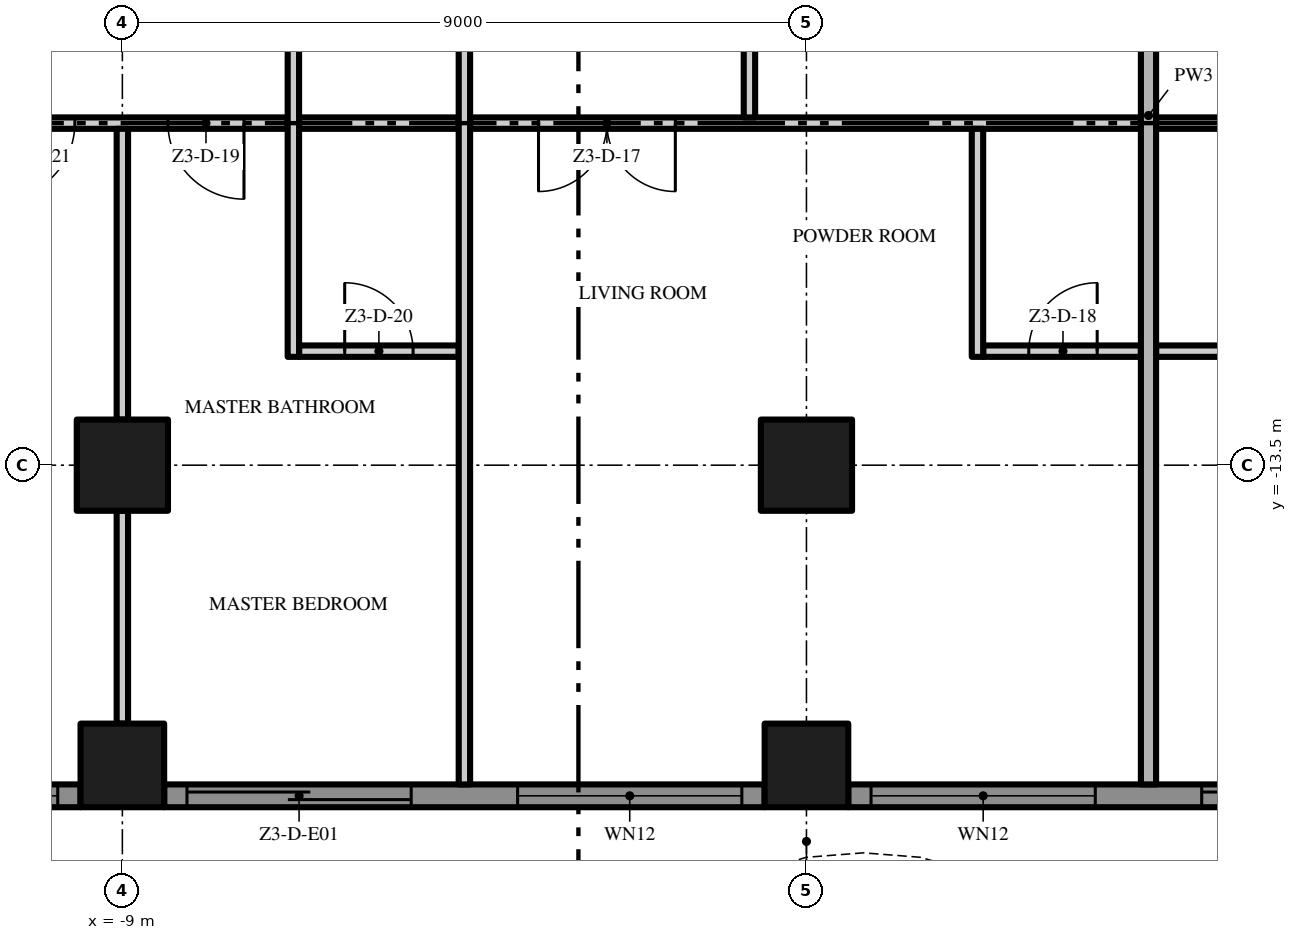
"""IFC4 building model, lengths in metres.
Left out: names, types, materials, properties, quantities, classifications, styles, units other than length and angle.
Written with IfcOpenShell. Run it as: python <this file> out.ifc"""

import sys

from ifc_helpers import new_model, si_unit, direction, frame, frame_2d, origin, origin_2d, place, context, subcontext, project, spatial, polyline, rectangle, outline, extrude, element, fill, save


model = new_model("IFC4")
c1 = context("Model", 3, precision=1e-05, world=origin(), true_north=direction((0.0, 1.0)))
c2 = subcontext(c1, "Body", "Model", "MODEL_VIEW")
j1 = project(units=[si_unit("LENGTHUNIT", "METRE"), si_unit("PLANEANGLEUNIT", "RADIAN")], contexts=[c1])
p1 = place(None, origin())
s1 = spatial("IfcSite", under=j1, at=p1, CompositionType="ELEMENT")
p2 = place(p1, origin())
s2 = spatial("IfcBuilding", under=s1, at=p2, CompositionType="ELEMENT")
p3 = place(p2, frame((0.0, 0.0, 159.2)))
s3 = spatial("IfcBuildingStorey", under=s2, at=p3, CompositionType="ELEMENT", Elevation=159.2)
p4 = place(p3, frame((-9.0, -13.5, 0.0), z_axis=(0.0, 0.0, 1.0), x_axis=(1.0, 0.0, 0.0)))
e1 = element("IfcColumn", 1, at=p4, inside=s3, PredefinedType="COLUMN", context=c2, shape_type="SweptSolid", body=[
    extrude(rectangle(XDim=1.2, YDim=1.2, at=origin_2d()), origin(), (0.0, 0.0, 1.0), 3.5),
])
p5 = place(p3, frame((-9.0, -17.45, 0.0), z_axis=(0.0, 0.0, 1.0), x_axis=(1.0, 0.0, 0.0)))
e2 = element("IfcColumn", 2, at=p5, inside=s3, PredefinedType="COLUMN", context=c2, shape_type="SweptSolid", body=[
    extrude(rectangle(XDim=1.1, YDim=1.1, at=origin_2d()), origin(), (0.0, 0.0, 1.0), 3.5),
])
p6 = place(p3, frame((0.0, -13.5, 0.0), z_axis=(0.0, 0.0, 1.0), x_axis=(1.0, 0.0, 0.0)))
e3 = element("IfcColumn", 3, at=p6, inside=s3, PredefinedType="COLUMN", context=c2, shape_type="SweptSolid", body=[
    extrude(rectangle(XDim=1.2, YDim=1.2, at=origin_2d()), origin(), (0.0, 0.0, 1.0), 3.5),
])
p7 = place(p3, frame((0.0, -17.45, 0.0), z_axis=(0.0, 0.0, 1.0), x_axis=(1.0, 0.0, 0.0)))
e4 = element("IfcColumn", 4, at=p7, inside=s3, PredefinedType="COLUMN", context=c2, shape_type="SweptSolid", body=[
    extrude(rectangle(XDim=1.1, YDim=1.1, at=origin_2d()), origin(), (0.0, 0.0, 1.0), 3.5),
])
p8 = place(p3, frame((-9.55, -17.85, 0.0), z_axis=(0.0, 0.0, 1.0), x_axis=(-1.0, 0.0, 0.0)))
e5 = element("IfcWall", 5, at=p8, inside=s3, PredefinedType="SOLIDWALL", context=c2, shape_type="SweptSolid", body=[
    extrude(rectangle(XDim=7.35, YDim=0.3, at=frame_2d((3.675, 0.0))), origin(), (0.0, 0.0, 1.0), 3.5),
])
p9 = place(p8, frame((4.65, 0.0, 0.45)))
e6 = element("IfcOpeningElement", 6, at=p9, cuts=e5, PredefinedType="OPENING", context=c2, shape_type="SweptSolid", body=[
    extrude(rectangle(XDim=2.4, YDim=2.65, at=frame_2d((1.2, 1.325))), frame((0.0, 0.16, 0.0), z_axis=(0.0, -1.0, 0.0), x_axis=(1.0, 0.0, 0.0)), (0.0, 0.0, 1.0), 0.32),
])
p10 = place(p8, frame((0.3, 0.0, 0.45)))
e7 = element("IfcOpeningElement", 7, at=p10, cuts=e5, PredefinedType="OPENING", context=c2, shape_type="SweptSolid", body=[
    extrude(rectangle(XDim=2.95, YDim=2.65, at=frame_2d((1.475, 1.325))), frame((0.0, 0.16, 0.0), z_axis=(0.0, -1.0, 0.0), x_axis=(1.0, 0.0, 0.0)), (0.0, 0.0, 1.0), 0.32),
])
p11 = place(p3, frame((-0.55, -17.85, 0.0), z_axis=(0.0, 0.0, 1.0), x_axis=(-1.0, 0.0, 0.0)))
e8 = element("IfcWall", 8, at=p11, inside=s3, PredefinedType="SOLIDWALL", context=c2, shape_type="SweptSolid", body=[
    extrude(rectangle(XDim=7.9, YDim=0.3, at=frame_2d((3.95, 0.0))), origin(), (0.0, 0.0, 1.0), 3.5),
])
p12 = place(p11, frame((4.65, 0.0, 0.0)))
e9 = element("IfcOpeningElement", 9, at=p12, cuts=e8, PredefinedType="OPENING", context=c2, shape_type="SweptSolid", body=[
    extrude(rectangle(XDim=2.95, YDim=2.4, at=frame_2d((1.475, 1.2))), frame((0.0, 0.16, 0.0), z_axis=(0.0, -1.0, 0.0), x_axis=(1.0, 0.0, 0.0)), (0.0, 0.0, 1.0), 0.32),
])
p13 = place(p11, frame((0.3, 0.0, 0.45)))
e10 = element("IfcOpeningElement", 10, at=p13, cuts=e8, PredefinedType="OPENING", context=c2, shape_type="SweptSolid", body=[
    extrude(rectangle(XDim=2.95, YDim=2.65, at=frame_2d((1.475, 1.325))), frame((0.0, 0.16, 0.0), z_axis=(0.0, -1.0, 0.0), x_axis=(1.0, 0.0, 0.0)), (0.0, 0.0, 1.0), 0.32),
])
p14 = place(p3, frame((8.45, -17.85, 0.0), z_axis=(0.0, 0.0, 1.0), x_axis=(-1.0, 0.0, 0.0)))
e11 = element("IfcWall", 11, at=p14, inside=s3, PredefinedType="SOLIDWALL", context=c2, shape_type="SweptSolid", body=[
    extrude(rectangle(XDim=7.9, YDim=0.3, at=frame_2d((3.95, 0.0))), origin(), (0.0, 0.0, 1.0), 3.5),
])
p15 = place(p14, frame((4.65, 0.0, 0.45)))
e12 = element("IfcOpeningElement", 12, at=p15, cuts=e11, PredefinedType="OPENING", context=c2, shape_type="SweptSolid", body=[
    extrude(rectangle(XDim=2.95, YDim=2.65, at=frame_2d((1.475, 1.325))), frame((0.0, 0.16, 0.0), z_axis=(0.0, -1.0, 0.0), x_axis=(1.0, 0.0, 0.0)), (0.0, 0.0, 1.0), 0.32),
])
p16 = place(p14, frame((0.3, 0.0, 0.0)))
e13 = element("IfcOpeningElement", 13, at=p16, cuts=e11, PredefinedType="OPENING", context=c2, shape_type="SweptSolid", body=[
    extrude(rectangle(XDim=2.95, YDim=2.4, at=frame_2d((1.475, 1.2))), frame((0.0, 0.16, 0.0), z_axis=(0.0, -1.0, 0.0), x_axis=(1.0, 0.0, 0.0)), (0.0, 0.0, 1.0), 0.32),
])
p17 = place(p3, origin())
e14 = element("IfcWall", 14, at=p17, inside=s3, PredefinedType="USERDEFINED", context=c2, shape_type="SweptSolid", body=[
    extrude(outline(polyline([(-18.0, -19.8), (-16.5, -19.095), (-15.0, -18.659), (-14.25, -18.6), (-13.5, -18.659), (-12.0, -19.095), (-10.5, -19.8), (-9.0, -20.505), (-7.5, -20.941), (-6.75, -21.0), (-6.0, -20.941), (-4.5, -20.505), (-3.0, -19.8), (-1.5, -19.095), (0.0, -18.659), (0.75, -18.6), (1.5, -18.659), (3.0, -19.095), (4.5, -19.8), (6.0, -20.505), (7.5, -20.941), (8.25, -21.0), (9.0, -20.941), (10.5, -20.505), (12.0, -19.8), (13.5, -19.095), (15.0, -18.659), (15.75, -18.6), (16.5, -18.659), (18.0, -19.095), (18.07, -18.855), (16.545, -18.411), (15.75, -18.349), (14.955, -18.411), (13.411, -18.86), (11.894, -19.574), (10.411, -20.271), (8.955, -20.694), (8.25, -20.749), (7.545, -20.694), (6.089, -20.271), (4.606, -19.574), (3.089, -18.86), (1.545, -18.411), (0.75, -18.349), (-0.045, -18.411), (-1.589, -18.86), (-3.106, -19.574), (-4.589, -20.271), (-6.045, -20.694), (-6.75, -20.749), (-7.455, -20.694), (-8.911, -20.271), (-10.394, -19.574), (-11.911, -18.86), (-13.455, -18.411), (-14.25, -18.349), (-15.045, -18.411), (-16.589, -18.86), (-18.106, -19.574), (-18.0, -19.8)])), origin(), (0.0, 0.0, 1.0), 0.9),
])
p18 = place(p3, frame((-6.675, -12.0, 0.0), z_axis=(0.0, 0.0, 1.0), x_axis=(1.0, 0.0, 0.0)))
e15 = element("IfcWall", 15, at=p18, inside=s3, PredefinedType="PARTITIONING", context=c2, shape_type="SweptSolid", body=[
    extrude(rectangle(XDim=2.1, YDim=0.15, at=frame_2d((1.05, 0.0))), origin(), (0.0, 0.0, 1.0), 3.5),
])
p19 = place(p18, frame((0.6, 0.0, 0.0)))
e16 = element("IfcOpeningElement", 16, at=p19, cuts=e15, PredefinedType="OPENING", context=c2, shape_type="SweptSolid", body=[
    extrude(rectangle(XDim=0.9, YDim=2.1, at=frame_2d((0.45, 1.05))), frame((0.0, 0.085, 0.0), z_axis=(0.0, -1.0, 0.0), x_axis=(1.0, 0.0, 0.0)), (0.0, 0.0, 1.0), 0.17),
])
p20 = place(p3, frame((2.325, -12.0, 0.0), z_axis=(0.0, 0.0, 1.0), x_axis=(1.0, 0.0, 0.0)))
e17 = element("IfcWall", 17, at=p20, inside=s3, PredefinedType="PARTITIONING", context=c2, shape_type="SweptSolid", body=[
    extrude(rectangle(XDim=2.075, YDim=0.15, at=frame_2d((1.038, 0.0))), origin(), (0.0, 0.0, 1.0), 3.5),
])
p21 = place(p20, frame((0.6, 0.0, 0.0)))
e18 = element("IfcOpeningElement", 18, at=p21, cuts=e17, PredefinedType="OPENING", context=c2, shape_type="SweptSolid", body=[
    extrude(rectangle(XDim=0.9, YDim=2.1, at=frame_2d((0.45, 1.05))), frame((0.0, 0.085, 0.0), z_axis=(0.0, -1.0, 0.0), x_axis=(1.0, 0.0, 0.0)), (0.0, 0.0, 1.0), 0.17),
])
p22 = place(p3, frame((4.6, -12.0, 0.0), z_axis=(0.0, 0.0, 1.0), x_axis=(1.0, 0.0, 0.0)))
e19 = element("IfcWall", 19, at=p22, inside=s3, PredefinedType="PARTITIONING", context=c2, shape_type="SweptSolid", body=[
    extrude(rectangle(XDim=2.075, YDim=0.15, at=frame_2d((1.038, 0.0))), origin(), (0.0, 0.0, 1.0), 3.5),
])
p23 = place(p3, frame((-6.825, -9.0, 0.0), z_axis=(0.0, 0.0, 1.0), x_axis=(-1.0, 0.0, 0.0)))
e20 = element("IfcWall", 20, at=p23, inside=s3, PredefinedType="PARTITIONING", context=c2, shape_type="SweptSolid", body=[
    extrude(rectangle(XDim=4.35, YDim=0.15, at=frame_2d((2.175, 0.0))), origin(), (0.0, 0.0, 1.0), 3.5),
])
p24 = place(p23, frame((0.575, 0.0, 0.0)))
e21 = element("IfcOpeningElement", 21, at=p24, cuts=e20, PredefinedType="OPENING", context=c2, shape_type="SweptSolid", body=[
    extrude(rectangle(XDim=1.0, YDim=2.4, at=frame_2d((0.5, 1.2))), frame((0.0, 0.085, 0.0), z_axis=(0.0, -1.0, 0.0), x_axis=(1.0, 0.0, 0.0)), (0.0, 0.0, 1.0), 0.17),
])
p25 = place(p23, frame((2.8, 0.0, 0.0)))
e22 = element("IfcOpeningElement", 22, at=p25, cuts=e20, PredefinedType="OPENING", context=c2, shape_type="SweptSolid", body=[
    extrude(rectangle(XDim=1.0, YDim=2.4, at=frame_2d((0.5, 1.2))), frame((0.0, 0.085, 0.0), z_axis=(0.0, -1.0, 0.0), x_axis=(1.0, 0.0, 0.0)), (0.0, 0.0, 1.0), 0.17),
])
p26 = place(p3, frame((-6.675, -9.0, 0.0), z_axis=(0.0, 0.0, 1.0), x_axis=(1.0, 0.0, 0.0)))
e23 = element("IfcWall", 23, at=p26, inside=s3, PredefinedType="PARTITIONING", context=c2, shape_type="SweptSolid", body=[
    extrude(rectangle(XDim=2.1, YDim=0.15, at=frame_2d((1.05, 0.0))), origin(), (0.0, 0.0, 1.0), 3.5),
])
p27 = place(p3, frame((4.4, -9.0, 0.0), z_axis=(0.0, 0.0, 1.0), x_axis=(-1.0, 0.0, 0.0)))
e24 = element("IfcWall", 24, at=p27, inside=s3, PredefinedType="PARTITIONING", context=c2, shape_type="SweptSolid", body=[
    extrude(rectangle(XDim=8.825, YDim=0.15, at=frame_2d((4.412, 0.0))), origin(), (0.0, 0.0, 1.0), 3.5),
])
p28 = place(p27, frame((6.125, 0.0, 0.0)))
e25 = element("IfcOpeningElement", 25, at=p28, cuts=e24, PredefinedType="OPENING", context=c2, shape_type="SweptSolid", body=[
    extrude(rectangle(XDim=1.8, YDim=2.4, at=frame_2d((0.9, 1.2))), frame((0.0, 0.085, 0.0), z_axis=(0.0, -1.0, 0.0), x_axis=(1.0, 0.0, 0.0)), (0.0, 0.0, 1.0), 0.17),
])
p29 = place(p3, frame((4.6, -9.0, 0.0), z_axis=(0.0, 0.0, 1.0), x_axis=(1.0, 0.0, 0.0)))
e26 = element("IfcWall", 26, at=p29, inside=s3, PredefinedType="PARTITIONING", context=c2, shape_type="SweptSolid", body=[
    extrude(rectangle(XDim=2.075, YDim=0.15, at=frame_2d((1.038, 0.0))), origin(), (0.0, 0.0, 1.0), 3.5),
])
p30 = place(p3, frame((-9.0, -16.9, 0.0), z_axis=(0.0, 0.0, 1.0), x_axis=(0.0, 1.0, 0.0)))
e27 = element("IfcWall", 27, at=p30, inside=s3, PredefinedType="PARTITIONING", context=c2, shape_type="SweptSolid", body=[
    extrude(rectangle(XDim=2.8, YDim=0.15, at=frame_2d((1.4, 0.0))), origin(), (0.0, 0.0, 1.0), 3.5),
])
p31 = place(p3, frame((-9.0, -12.9, 0.0), z_axis=(0.0, 0.0, 1.0), x_axis=(0.0, 1.0, 0.0)))
e28 = element("IfcWall", 28, at=p31, inside=s3, PredefinedType="PARTITIONING", context=c2, shape_type="SweptSolid", body=[
    extrude(rectangle(XDim=3.825, YDim=0.15, at=frame_2d((1.913, 0.0))), origin(), (0.0, 0.0, 1.0), 3.5),
])
p32 = place(p3, frame((-6.75, -12.075, 0.0), z_axis=(0.0, 0.0, 1.0), x_axis=(0.0, 1.0, 0.0)))
e29 = element("IfcWall", 29, at=p32, inside=s3, PredefinedType="PARTITIONING", context=c2, shape_type="SweptSolid", body=[
    extrude(rectangle(XDim=7.65, YDim=0.15, at=frame_2d((3.825, 0.0))), origin(), (0.0, 0.0, 1.0), 3.5),
])
p33 = place(p3, frame((-4.5, -17.7, 0.0), z_axis=(0.0, 0.0, 1.0), x_axis=(0.0, 1.0, 0.0)))
e30 = element("IfcWall", 30, at=p33, inside=s3, PredefinedType="PARTITIONING", context=c2, shape_type="SweptSolid", body=[
    extrude(rectangle(XDim=13.275, YDim=0.15, at=frame_2d((6.638, 0.0))), origin(), (0.0, 0.0, 1.0), 3.5),
])
p34 = place(p33, frame((10.5, 0.0, 0.0)))
e31 = element("IfcOpeningElement", 31, at=p34, cuts=e30, PredefinedType="OPENING", context=c2, shape_type="SweptSolid", body=[
    extrude(rectangle(XDim=0.9, YDim=2.1, at=frame_2d((0.45, 1.05))), frame((0.0, 0.085, 0.0), z_axis=(0.0, -1.0, 0.0), x_axis=(1.0, 0.0, 0.0)), (0.0, 0.0, 1.0), 0.17),
])
p35 = place(p3, frame((-0.75, -8.925, 0.0), z_axis=(0.0, 0.0, 1.0), x_axis=(0.0, 1.0, 0.0)))
e32 = element("IfcWall", 32, at=p35, inside=s3, PredefinedType="PARTITIONING", context=c2, shape_type="SweptSolid", body=[
    extrude(rectangle(XDim=4.5, YDim=0.15, at=frame_2d((2.25, 0.0))), origin(), (0.0, 0.0, 1.0), 3.5),
])
p36 = place(p3, frame((2.25, -12.075, 0.0), z_axis=(0.0, 0.0, 1.0), x_axis=(0.0, 1.0, 0.0)))
e33 = element("IfcWall", 33, at=p36, inside=s3, PredefinedType="PARTITIONING", context=c2, shape_type="SweptSolid", body=[
    extrude(rectangle(XDim=3.0, YDim=0.15, at=frame_2d((1.5, 0.0))), origin(), (0.0, 0.0, 1.0), 3.5),
])
p37 = place(p3, frame((4.5, -17.7, 0.0), z_axis=(0.0, 0.0, 1.0), x_axis=(0.0, 1.0, 0.0)))
e34 = element("IfcWall", 34, at=p37, inside=s3, PredefinedType="PARTITIONING", context=c2, shape_type="SweptSolid", body=[
    extrude(rectangle(XDim=17.6, YDim=0.2, at=frame_2d((8.8, 0.0))), origin(), (0.0, 0.0, 1.0), 3.5),
])
p38 = place(p10, origin())
e35 = element("IfcWindow", 35, at=p38, inside=s3, PartitioningType="SINGLE_PANEL", PredefinedType="WINDOW", context=c2, shape_type="SweptSolid", body=[
    extrude(rectangle(XDim=2.95, YDim=2.65, at=frame_2d((1.475, 1.325))), frame((0.0, 0.03, 0.0), z_axis=(0.0, -1.0, 0.0), x_axis=(1.0, 0.0, 0.0)), (0.0, 0.0, 1.0), 0.06),
])
fill(e7, e35)
p39 = place(p12, origin())
e36 = element("IfcDoor", 36, at=p39, inside=s3, OperationType="SINGLE_SWING_LEFT", PredefinedType="DOOR", context=c2, shape_type="SweptSolid", body=[
    extrude(rectangle(XDim=2.95, YDim=2.4, at=frame_2d((1.475, 1.2))), frame((0.0, 0.025, 0.0), z_axis=(0.0, -1.0, 0.0), x_axis=(1.0, 0.0, 0.0)), (0.0, 0.0, 1.0), 0.05),
])
fill(e9, e36)
p40 = place(p13, origin())
e37 = element("IfcWindow", 37, at=p40, inside=s3, PartitioningType="SINGLE_PANEL", PredefinedType="WINDOW", context=c2, shape_type="SweptSolid", body=[
    extrude(rectangle(XDim=2.95, YDim=2.65, at=frame_2d((1.475, 1.325))), frame((0.0, 0.03, 0.0), z_axis=(0.0, -1.0, 0.0), x_axis=(1.0, 0.0, 0.0)), (0.0, 0.0, 1.0), 0.06),
])
fill(e10, e37)
p41 = place(p15, origin())
e38 = element("IfcWindow", 38, at=p41, inside=s3, PartitioningType="SINGLE_PANEL", PredefinedType="WINDOW", context=c2, shape_type="SweptSolid", body=[
    extrude(rectangle(XDim=2.95, YDim=2.65, at=frame_2d((1.475, 1.325))), frame((0.0, 0.03, 0.0), z_axis=(0.0, -1.0, 0.0), x_axis=(1.0, 0.0, 0.0)), (0.0, 0.0, 1.0), 0.06),
])
fill(e12, e38)
p42 = place(p16, origin())
e39 = element("IfcDoor", 39, at=p42, inside=s3, OperationType="SINGLE_SWING_LEFT", PredefinedType="DOOR", context=c2, shape_type="SweptSolid", body=[
    extrude(rectangle(XDim=2.95, YDim=2.4, at=frame_2d((1.475, 1.2))), frame((0.0, 0.025, 0.0), z_axis=(0.0, -1.0, 0.0), x_axis=(1.0, 0.0, 0.0)), (0.0, 0.0, 1.0), 0.05),
])
fill(e13, e39)
p43 = place(p28, origin())
e40 = element("IfcDoor", 40, at=p43, inside=s3, OperationType="DOUBLE_DOOR_SINGLE_SWING", PredefinedType="DOOR", context=c2, shape_type="SweptSolid", body=[
    extrude(rectangle(XDim=1.8, YDim=2.4, at=frame_2d((0.9, 1.2))), frame((0.0, 0.025, 0.0), z_axis=(0.0, -1.0, 0.0), x_axis=(1.0, 0.0, 0.0)), (0.0, 0.0, 1.0), 0.05),
])
fill(e25, e40)
p44 = place(p21, origin())
e41 = element("IfcDoor", 41, at=p44, inside=s3, OperationType="SINGLE_SWING_RIGHT", PredefinedType="DOOR", context=c2, shape_type="SweptSolid", body=[
    extrude(rectangle(XDim=0.9, YDim=2.1, at=frame_2d((0.45, 1.05))), frame((0.0, 0.025, 0.0), z_axis=(0.0, -1.0, 0.0), x_axis=(1.0, 0.0, 0.0)), (0.0, 0.0, 1.0), 0.05),
])
fill(e18, e41)
p45 = place(p24, origin())
e42 = element("IfcDoor", 42, at=p45, inside=s3, OperationType="SINGLE_SWING_LEFT", PredefinedType="DOOR", context=c2, shape_type="SweptSolid", body=[
    extrude(rectangle(XDim=1.0, YDim=2.4, at=frame_2d((0.5, 1.2))), frame((0.0, 0.025, 0.0), z_axis=(0.0, -1.0, 0.0), x_axis=(1.0, 0.0, 0.0)), (0.0, 0.0, 1.0), 0.05),
])
fill(e21, e42)
p46 = place(p19, origin())
e43 = element("IfcDoor", 43, at=p46, inside=s3, OperationType="SINGLE_SWING_LEFT", PredefinedType="DOOR", context=c2, shape_type="SweptSolid", body=[
    extrude(rectangle(XDim=0.9, YDim=2.1, at=frame_2d((0.45, 1.05))), frame((0.0, 0.025, 0.0), z_axis=(0.0, -1.0, 0.0), x_axis=(1.0, 0.0, 0.0)), (0.0, 0.0, 1.0), 0.05),
])
fill(e16, e43)
p47 = place(p25, origin())
e44 = element("IfcDoor", 44, at=p47, inside=s3, OperationType="SINGLE_SWING_RIGHT", PredefinedType="DOOR", context=c2, shape_type="SweptSolid", body=[
    extrude(rectangle(XDim=1.0, YDim=2.4, at=frame_2d((0.5, 1.2))), frame((0.0, 0.025, 0.0), z_axis=(0.0, -1.0, 0.0), x_axis=(1.0, 0.0, 0.0)), (0.0, 0.0, 1.0), 0.05),
])
fill(e22, e44)
save(model, sys.argv[1])
